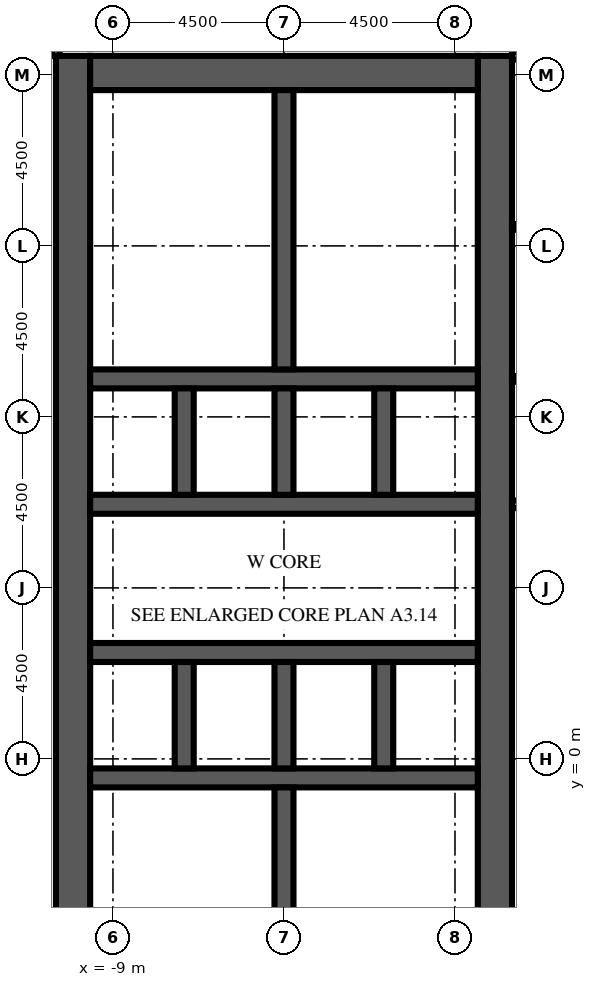
"""IFC4 building model, lengths in metres.
Left out: names, types, materials, properties, quantities, classifications, styles, units other than length and angle.
Written with IfcOpenShell. Run it as: python <this file> out.ifc"""

import sys

from ifc_helpers import new_model, si_unit, direction, frame, frame_2d, origin, place, context, subcontext, project, spatial, rectangle, extrude, element, fill, save


model = new_model("IFC4")
c1 = context("Model", 3, precision=1e-05, world=origin(), true_north=direction((0.0, 1.0)))
c2 = subcontext(c1, "Body", "Model", "MODEL_VIEW")
j1 = project(units=[si_unit("LENGTHUNIT", "METRE"), si_unit("PLANEANGLEUNIT", "RADIAN")], contexts=[c1])
p1 = place(None, origin())
s1 = spatial("IfcSite", under=j1, at=p1, CompositionType="ELEMENT")
p2 = place(p1, origin())
s2 = spatial("IfcBuilding", under=s1, at=p2, CompositionType="ELEMENT")
p3 = place(p2, frame((0.0, 0.0, 82.0)))
s3 = spatial("IfcBuildingStorey", under=s2, at=p3, CompositionType="ELEMENT", Elevation=82.0)
p4 = place(p3, frame((-10.05, -9.0, 0.0), z_axis=(0.0, 0.0, 1.0), x_axis=(0.0, 1.0, 0.0)))
e1 = element("IfcWall", 1, at=p4, inside=s3, PredefinedType="SHEAR", context=c2, shape_type="SweptSolid", body=[
    extrude(rectangle(XDim=27.5, YDim=0.9, at=frame_2d((13.75, 0.0))), origin(), (0.0, 0.0, 1.0), 4.1),
])
p5 = place(p4, frame((12.55, 0.0, 0.0)))
e2 = element("IfcOpeningElement", 2, at=p5, cuts=e1, PredefinedType="OPENING", context=c2, shape_type="SweptSolid", body=[
    extrude(rectangle(XDim=2.4, YDim=2.4, at=frame_2d((1.2, 1.2))), frame((0.0, 0.46, 0.0), z_axis=(0.0, -1.0, 0.0), x_axis=(1.0, 0.0, 0.0)), (0.0, 0.0, 1.0), 0.92),
])
p6 = place(p4, frame((6.825, 0.0, 0.0)))
e3 = element("IfcOpeningElement", 3, at=p6, cuts=e1, PredefinedType="OPENING", context=c2, shape_type="SweptSolid", body=[
    extrude(rectangle(XDim=1.2, YDim=2.1, at=frame_2d((0.6, 1.05))), frame((0.0, 0.46, 0.0), z_axis=(0.0, -1.0, 0.0), x_axis=(1.0, 0.0, 0.0)), (0.0, 0.0, 1.0), 0.92),
])
p7 = place(p4, frame((19.475, 0.0, 0.0)))
e4 = element("IfcOpeningElement", 4, at=p7, cuts=e1, PredefinedType="OPENING", context=c2, shape_type="SweptSolid", body=[
    extrude(rectangle(XDim=1.2, YDim=2.1, at=frame_2d((0.6, 1.05))), frame((0.0, 0.46, 0.0), z_axis=(0.0, -1.0, 0.0), x_axis=(1.0, 0.0, 0.0)), (0.0, 0.0, 1.0), 0.92),
])
p8 = place(p3, frame((1.05, -9.0, 0.0), z_axis=(0.0, 0.0, 1.0), x_axis=(0.0, 1.0, 0.0)))
e5 = element("IfcWall", 5, at=p8, inside=s3, PredefinedType="SHEAR", context=c2, shape_type="SweptSolid", body=[
    extrude(rectangle(XDim=27.5, YDim=0.9, at=frame_2d((13.75, 0.0))), origin(), (0.0, 0.0, 1.0), 4.1),
])
p9 = place(p8, frame((12.55, 0.0, 0.0)))
e6 = element("IfcOpeningElement", 6, at=p9, cuts=e5, PredefinedType="OPENING", context=c2, shape_type="SweptSolid", body=[
    extrude(rectangle(XDim=2.4, YDim=2.4, at=frame_2d((1.2, 1.2))), frame((0.0, 0.46, 0.0), z_axis=(0.0, -1.0, 0.0), x_axis=(1.0, 0.0, 0.0)), (0.0, 0.0, 1.0), 0.92),
])
p10 = place(p8, frame((5.445, 0.0, 0.0)))
e7 = element("IfcOpeningElement", 7, at=p10, cuts=e5, PredefinedType="OPENING", context=c2, shape_type="SweptSolid", body=[
    extrude(rectangle(XDim=1.2, YDim=2.1, at=frame_2d((0.6, 1.05))), frame((0.0, 0.46, 0.0), z_axis=(0.0, -1.0, 0.0), x_axis=(1.0, 0.0, 0.0)), (0.0, 0.0, 1.0), 0.92),
])
p11 = place(p8, frame((19.485, 0.0, 0.0)))
e8 = element("IfcOpeningElement", 8, at=p11, cuts=e5, PredefinedType="OPENING", context=c2, shape_type="SweptSolid", body=[
    extrude(rectangle(XDim=1.0, YDim=2.1, at=frame_2d((0.5, 1.05))), frame((0.0, 0.46, 0.0), z_axis=(0.0, -1.0, 0.0), x_axis=(1.0, 0.0, 0.0)), (0.0, 0.0, 1.0), 0.92),
])
p12 = place(p8, frame((21.139, 0.0, 0.0)))
e9 = element("IfcOpeningElement", 9, at=p12, cuts=e5, PredefinedType="OPENING", context=c2, shape_type="SweptSolid", body=[
    extrude(rectangle(XDim=1.0, YDim=2.1, at=frame_2d((0.5, 1.05))), frame((0.0, 0.46, 0.0), z_axis=(0.0, -1.0, 0.0), x_axis=(1.0, 0.0, 0.0)), (0.0, 0.0, 1.0), 0.92),
])
p13 = place(p8, frame((23.16, 0.0, 0.0)))
e10 = element("IfcOpeningElement", 10, at=p13, cuts=e5, PredefinedType="OPENING", context=c2, shape_type="SweptSolid", body=[
    extrude(rectangle(XDim=1.0, YDim=2.1, at=frame_2d((0.5, 1.05))), frame((0.0, 0.46, 0.0), z_axis=(0.0, -1.0, 0.0), x_axis=(1.0, 0.0, 0.0)), (0.0, 0.0, 1.0), 0.92),
])
p14 = place(p8, frame((25.181, 0.0, 0.0)))
e11 = element("IfcOpeningElement", 11, at=p14, cuts=e5, PredefinedType="OPENING", context=c2, shape_type="SweptSolid", body=[
    extrude(rectangle(XDim=1.0, YDim=2.1, at=frame_2d((0.5, 1.05))), frame((0.0, 0.46, 0.0), z_axis=(0.0, -1.0, 0.0), x_axis=(1.0, 0.0, 0.0)), (0.0, 0.0, 1.0), 0.92),
])
p15 = place(p3, frame((-9.6, 18.05, 0.0), z_axis=(0.0, 0.0, 1.0), x_axis=(1.0, 0.0, 0.0)))
e12 = element("IfcWall", 12, at=p15, inside=s3, PredefinedType="SHEAR", context=c2, shape_type="SweptSolid", body=[
    extrude(rectangle(XDim=10.2, YDim=0.9, at=frame_2d((5.1, 0.0))), origin(), (0.0, 0.0, 1.0), 4.1),
])
p16 = place(p3, frame((-9.6, -0.5, 0.0), z_axis=(0.0, 0.0, 1.0), x_axis=(1.0, 0.0, 0.0)))
e13 = element("IfcWall", 13, at=p16, inside=s3, PredefinedType="SHEAR", context=c2, shape_type="SweptSolid", body=[
    extrude(rectangle(XDim=10.2, YDim=0.5, at=frame_2d((5.1, 0.0))), origin(), (0.0, 0.0, 1.0), 4.1),
])
p17 = place(p3, frame((-9.6, 2.8, 0.0), z_axis=(0.0, 0.0, 1.0), x_axis=(1.0, 0.0, 0.0)))
e14 = element("IfcWall", 14, at=p17, inside=s3, PredefinedType="SHEAR", context=c2, shape_type="SweptSolid", body=[
    extrude(rectangle(XDim=10.2, YDim=0.5, at=frame_2d((5.1, 0.0))), origin(), (0.0, 0.0, 1.0), 4.1),
])
p18 = place(p17, frame((0.562, 0.0, 0.0)))
e15 = element("IfcOpeningElement", 15, at=p18, cuts=e14, PredefinedType="OPENING", context=c2, shape_type="SweptSolid", body=[
    extrude(rectangle(XDim=1.1, YDim=2.1, at=frame_2d((0.55, 1.05))), frame((0.0, 0.26, 0.0), z_axis=(0.0, -1.0, 0.0), x_axis=(1.0, 0.0, 0.0)), (0.0, 0.0, 1.0), 0.52),
])
p19 = place(p17, frame((3.238, 0.0, 0.0)))
e16 = element("IfcOpeningElement", 16, at=p19, cuts=e14, PredefinedType="OPENING", context=c2, shape_type="SweptSolid", body=[
    extrude(rectangle(XDim=1.1, YDim=2.1, at=frame_2d((0.55, 1.05))), frame((0.0, 0.26, 0.0), z_axis=(0.0, -1.0, 0.0), x_axis=(1.0, 0.0, 0.0)), (0.0, 0.0, 1.0), 0.52),
])
p20 = place(p17, frame((8.538, 0.0, 0.0)))
e17 = element("IfcOpeningElement", 17, at=p20, cuts=e14, PredefinedType="OPENING", context=c2, shape_type="SweptSolid", body=[
    extrude(rectangle(XDim=1.1, YDim=2.1, at=frame_2d((0.55, 1.05))), frame((0.0, 0.26, 0.0), z_axis=(0.0, -1.0, 0.0), x_axis=(1.0, 0.0, 0.0)), (0.0, 0.0, 1.0), 0.52),
])
p21 = place(p3, frame((-9.6, 6.7, 0.0), z_axis=(0.0, 0.0, 1.0), x_axis=(1.0, 0.0, 0.0)))
e18 = element("IfcWall", 18, at=p21, inside=s3, PredefinedType="SHEAR", context=c2, shape_type="SweptSolid", body=[
    extrude(rectangle(XDim=10.2, YDim=0.5, at=frame_2d((5.1, 0.0))), origin(), (0.0, 0.0, 1.0), 4.1),
])
p22 = place(p21, frame((0.562, 0.0, 0.0)))
e19 = element("IfcOpeningElement", 19, at=p22, cuts=e18, PredefinedType="OPENING", context=c2, shape_type="SweptSolid", body=[
    extrude(rectangle(XDim=1.1, YDim=2.1, at=frame_2d((0.55, 1.05))), frame((0.0, 0.26, 0.0), z_axis=(0.0, -1.0, 0.0), x_axis=(1.0, 0.0, 0.0)), (0.0, 0.0, 1.0), 0.52),
])
p23 = place(p21, frame((3.288, 0.0, 0.0)))
e20 = element("IfcOpeningElement", 20, at=p23, cuts=e18, PredefinedType="OPENING", context=c2, shape_type="SweptSolid", body=[
    extrude(rectangle(XDim=1.0, YDim=2.1, at=frame_2d((0.5, 1.05))), frame((0.0, 0.26, 0.0), z_axis=(0.0, -1.0, 0.0), x_axis=(1.0, 0.0, 0.0)), (0.0, 0.0, 1.0), 0.52),
])
p24 = place(p21, frame((5.913, 0.0, 0.0)))
e21 = element("IfcOpeningElement", 21, at=p24, cuts=e18, PredefinedType="OPENING", context=c2, shape_type="SweptSolid", body=[
    extrude(rectangle(XDim=1.0, YDim=2.1, at=frame_2d((0.5, 1.05))), frame((0.0, 0.26, 0.0), z_axis=(0.0, -1.0, 0.0), x_axis=(1.0, 0.0, 0.0)), (0.0, 0.0, 1.0), 0.52),
])
p25 = place(p21, frame((8.587, 0.0, 0.0)))
e22 = element("IfcOpeningElement", 22, at=p25, cuts=e18, PredefinedType="OPENING", context=c2, shape_type="SweptSolid", body=[
    extrude(rectangle(XDim=1.0, YDim=2.1, at=frame_2d((0.5, 1.05))), frame((0.0, 0.26, 0.0), z_axis=(0.0, -1.0, 0.0), x_axis=(1.0, 0.0, 0.0)), (0.0, 0.0, 1.0), 0.52),
])
p26 = place(p3, frame((-9.6, 10.0, 0.0), z_axis=(0.0, 0.0, 1.0), x_axis=(1.0, 0.0, 0.0)))
e23 = element("IfcWall", 23, at=p26, inside=s3, PredefinedType="SHEAR", context=c2, shape_type="SweptSolid", body=[
    extrude(rectangle(XDim=10.2, YDim=0.5, at=frame_2d((5.1, 0.0))), origin(), (0.0, 0.0, 1.0), 4.1),
])
for number, where, z_axis, x_axis in (
    (24, (-7.125, -0.25, 0.0), (0.0, 0.0, 1.0), (0.0, 1.0, 0.0)),
    (25, (-7.125, 6.95, 0.0), (0.0, 0.0, 1.0), (0.0, 1.0, 0.0)),
    (26, (-4.5, -0.25, 0.0), (0.0, 0.0, 1.0), (0.0, 1.0, 0.0)),
    (27, (-4.5, 6.95, 0.0), (0.0, 0.0, 1.0), (0.0, 1.0, 0.0)),
    (28, (-1.875, -0.25, 0.0), (0.0, 0.0, 1.0), (0.0, 1.0, 0.0)),
    (29, (-1.875, 6.95, 0.0), (0.0, 0.0, 1.0), (0.0, 1.0, 0.0)),
):
    element("IfcWall", number, at=place(p3, frame(where, z_axis=z_axis, x_axis=x_axis)), inside=s3, PredefinedType="SHEAR", context=c2, shape_type="SweptSolid", body=[
        extrude(rectangle(XDim=2.8, YDim=0.5, at=frame_2d((1.4, 0.0))), origin(), (0.0, 0.0, 1.0), 4.1),
    ])
for number, where, z_axis, x_axis in (
    (30, (-4.5, -8.1, 0.0), (0.0, 0.0, 1.0), (0.0, 1.0, 0.0)),
    (31, (-4.5, 10.25, 0.0), (0.0, 0.0, 1.0), (0.0, 1.0, 0.0)),
):
    element("IfcWall", number, at=place(p3, frame(where, z_axis=z_axis, x_axis=x_axis)), inside=s3, PredefinedType="SHEAR", context=c2, shape_type="SweptSolid", body=[
        extrude(rectangle(XDim=7.35, YDim=0.5, at=frame_2d((3.675, 0.0))), origin(), (0.0, 0.0, 1.0), 4.1),
    ])
p27 = place(p3, frame((-0.9, -5.16, 0.0), z_axis=(0.0, 0.0, 1.0), x_axis=(0.0, 1.0, 0.0)))
e32 = element("IfcWall", 32, at=p27, inside=s3, PredefinedType="PARTITIONING", context=c2, shape_type="SweptSolid", body=[
    extrude(rectangle(XDim=2.205, YDim=0.1, at=frame_2d((1.103, 0.0))), origin(), (0.0, 0.0, 1.0), 3.65),
])
p28 = place(p27, frame((0.603, 0.0, 0.0)))
e33 = element("IfcOpeningElement", 33, at=p28, cuts=e32, PredefinedType="OPENING", context=c2, shape_type="SweptSolid", body=[
    extrude(rectangle(XDim=1.0, YDim=2.1, at=frame_2d((0.5, 1.05))), frame((0.0, 0.06, 0.0), z_axis=(0.0, -1.0, 0.0), x_axis=(1.0, 0.0, 0.0)), (0.0, 0.0, 1.0), 0.12),
])
p29 = place(p3, frame((-0.9, -2.955, 0.0), z_axis=(0.0, 0.0, 1.0), x_axis=(0.0, 1.0, 0.0)))
e34 = element("IfcWall", 34, at=p29, inside=s3, PredefinedType="PARTITIONING", context=c2, shape_type="SweptSolid", body=[
    extrude(rectangle(XDim=2.205, YDim=0.1, at=frame_2d((1.103, 0.0))), origin(), (0.0, 0.0, 1.0), 3.65),
])
p30 = place(p29, frame((0.603, 0.0, 0.0)))
e35 = element("IfcOpeningElement", 35, at=p30, cuts=e34, PredefinedType="OPENING", context=c2, shape_type="SweptSolid", body=[
    extrude(rectangle(XDim=1.0, YDim=2.1, at=frame_2d((0.5, 1.05))), frame((0.0, 0.06, 0.0), z_axis=(0.0, -1.0, 0.0), x_axis=(1.0, 0.0, 0.0)), (0.0, 0.0, 1.0), 0.12),
])
p31 = place(p3, frame((-4.25, -2.955, 0.0), z_axis=(0.0, 0.0, 1.0), x_axis=(1.0, 0.0, 0.0)))
e36 = element("IfcWall", 36, at=p31, inside=s3, PredefinedType="PARTITIONING", context=c2, shape_type="SweptSolid", body=[
    extrude(rectangle(XDim=3.35, YDim=0.1, at=frame_2d((1.675, 0.0))), origin(), (0.0, 0.0, 1.0), 3.65),
])
for number, where, z_axis, x_axis in (
    (37, (-4.25, 11.72, 0.0), (0.0, 0.0, 1.0), (1.0, 0.0, 0.0)),
    (38, (-4.25, 13.558, 0.0), (0.0, 0.0, 1.0), (1.0, 0.0, 0.0)),
    (39, (-4.25, 15.762, 0.0), (0.0, 0.0, 1.0), (1.0, 0.0, 0.0)),
):
    element("IfcWall", number, at=place(p3, frame(where, z_axis=z_axis, x_axis=x_axis)), inside=s3, PredefinedType="PARTITIONING", context=c2, shape_type="SweptSolid", body=[
        extrude(rectangle(XDim=4.85, YDim=0.1, at=frame_2d((2.425, 0.0))), origin(), (0.0, 0.0, 1.0), 3.65),
    ])
p32 = place(p3, frame((-10.5, 31.35, 0.0), z_axis=(0.0, 0.0, 1.0), x_axis=(0.0, -1.0, 0.0)))
e40 = element("IfcWall", 40, at=p32, inside=s3, PredefinedType="PARTITIONING", context=c2, shape_type="SweptSolid", body=[
    extrude(rectangle(XDim=12.85, YDim=0.2, at=frame_2d((6.425, 0.0))), origin(), (0.0, 0.0, 1.0), 3.65),
])
p33 = place(p32, frame((9.75, 0.0, 0.0)))
e41 = element("IfcOpeningElement", 41, at=p33, cuts=e40, PredefinedType="OPENING", context=c2, shape_type="SweptSolid", body=[
    extrude(rectangle(XDim=1.0, YDim=2.1, at=frame_2d((0.5, 1.05))), frame((0.0, 0.11, 0.0), z_axis=(0.0, -1.0, 0.0), x_axis=(1.0, 0.0, 0.0)), (0.0, 0.0, 1.0), 0.22),
])
p34 = place(p3, frame((1.5, 6.7, 0.0), z_axis=(0.0, 0.0, 1.0), x_axis=(1.0, 0.0, 0.0)))
e42 = element("IfcWall", 42, at=p34, inside=s3, PredefinedType="PARTITIONING", context=c2, shape_type="SweptSolid", body=[
    extrude(rectangle(XDim=4.5, YDim=0.2, at=frame_2d((2.25, 0.0))), origin(), (0.0, 0.0, 1.0), 3.65),
])
p35 = place(p34, frame((1.85, 0.0, 0.0)))
e43 = element("IfcOpeningElement", 43, at=p35, cuts=e42, PredefinedType="OPENING", context=c2, shape_type="SweptSolid", body=[
    extrude(rectangle(XDim=1.0, YDim=2.1, at=frame_2d((0.5, 1.05))), frame((0.0, 0.11, 0.0), z_axis=(0.0, -1.0, 0.0), x_axis=(1.0, 0.0, 0.0)), (0.0, 0.0, 1.0), 0.22),
])
p36 = place(p3, frame((1.5, 10.0, 0.0), z_axis=(0.0, 0.0, 1.0), x_axis=(1.0, 0.0, 0.0)))
e44 = element("IfcWall", 44, at=p36, inside=s3, PredefinedType="PARTITIONING", context=c2, shape_type="SweptSolid", body=[
    extrude(rectangle(XDim=4.5, YDim=0.15, at=frame_2d((2.25, 0.0))), origin(), (0.0, 0.0, 1.0), 3.65),
])
p37 = place(p36, frame((1.35, 0.0, 0.0)))
e45 = element("IfcOpeningElement", 45, at=p37, cuts=e44, PredefinedType="OPENING", context=c2, shape_type="SweptSolid", body=[
    extrude(rectangle(XDim=1.0, YDim=2.1, at=frame_2d((0.5, 1.05))), frame((0.0, 0.085, 0.0), z_axis=(0.0, -1.0, 0.0), x_axis=(1.0, 0.0, 0.0)), (0.0, 0.0, 1.0), 0.17),
])
p38 = place(p3, frame((1.5, 14.0, 0.0), z_axis=(0.0, 0.0, 1.0), x_axis=(1.0, 0.0, 0.0)))
e46 = element("IfcWall", 46, at=p38, inside=s3, PredefinedType="PARTITIONING", context=c2, shape_type="SweptSolid", body=[
    extrude(rectangle(XDim=4.5, YDim=0.15, at=frame_2d((2.25, 0.0))), origin(), (0.0, 0.0, 1.0), 3.65),
])
p39 = place(p38, frame((1.85, 0.0, 0.0)))
e47 = element("IfcOpeningElement", 47, at=p39, cuts=e46, PredefinedType="OPENING", context=c2, shape_type="SweptSolid", body=[
    extrude(rectangle(XDim=1.0, YDim=2.1, at=frame_2d((0.5, 1.05))), frame((0.0, 0.085, 0.0), z_axis=(0.0, -1.0, 0.0), x_axis=(1.0, 0.0, 0.0)), (0.0, 0.0, 1.0), 0.17),
])
p40 = place(p3, frame((1.5, 18.5, 0.0), z_axis=(0.0, 0.0, 1.0), x_axis=(1.0, 0.0, 0.0)))
e48 = element("IfcWall", 48, at=p40, inside=s3, PredefinedType="PARTITIONING", context=c2, shape_type="SweptSolid", body=[
    extrude(rectangle(XDim=4.5, YDim=0.2, at=frame_2d((2.25, 0.0))), origin(), (0.0, 0.0, 1.0), 3.65),
])
p41 = place(p18, origin())
e49 = element("IfcDoor", 49, at=p41, inside=s3, OperationType="DOUBLE_DOOR_SLIDING", PredefinedType="DOOR", context=c2, shape_type="SweptSolid", body=[
    extrude(rectangle(XDim=1.1, YDim=2.1, at=frame_2d((0.55, 1.05))), frame((0.0, 0.025, 0.0), z_axis=(0.0, -1.0, 0.0), x_axis=(1.0, 0.0, 0.0)), (0.0, 0.0, 1.0), 0.05),
])
fill(e15, e49)
p42 = place(p19, origin())
e50 = element("IfcDoor", 50, at=p42, inside=s3, OperationType="DOUBLE_DOOR_SLIDING", PredefinedType="DOOR", context=c2, shape_type="SweptSolid", body=[
    extrude(rectangle(XDim=1.1, YDim=2.1, at=frame_2d((0.55, 1.05))), frame((0.0, 0.025, 0.0), z_axis=(0.0, -1.0, 0.0), x_axis=(1.0, 0.0, 0.0)), (0.0, 0.0, 1.0), 0.05),
])
fill(e16, e50)
p43 = place(p20, origin())
e51 = element("IfcDoor", 51, at=p43, inside=s3, OperationType="DOUBLE_DOOR_SLIDING", PredefinedType="DOOR", context=c2, shape_type="SweptSolid", body=[
    extrude(rectangle(XDim=1.1, YDim=2.1, at=frame_2d((0.55, 1.05))), frame((0.0, 0.025, 0.0), z_axis=(0.0, -1.0, 0.0), x_axis=(1.0, 0.0, 0.0)), (0.0, 0.0, 1.0), 0.05),
])
fill(e17, e51)
p44 = place(p22, origin())
e52 = element("IfcDoor", 52, at=p44, inside=s3, OperationType="DOUBLE_DOOR_SLIDING", PredefinedType="DOOR", context=c2, shape_type="SweptSolid", body=[
    extrude(rectangle(XDim=1.1, YDim=2.1, at=frame_2d((0.55, 1.05))), frame((0.0, 0.025, 0.0), z_axis=(0.0, -1.0, 0.0), x_axis=(1.0, 0.0, 0.0)), (0.0, 0.0, 1.0), 0.05),
])
fill(e19, e52)
p45 = place(p5, origin())
e53 = element("IfcDoor", 53, at=p45, inside=s3, OperationType="DOUBLE_DOOR_DOUBLE_SWING", PredefinedType="DOOR", context=c2, shape_type="SweptSolid", body=[
    extrude(rectangle(XDim=2.4, YDim=2.4, at=frame_2d((1.2, 1.2))), frame((0.0, 0.025, 0.0), z_axis=(0.0, -1.0, 0.0), x_axis=(1.0, 0.0, 0.0)), (0.0, 0.0, 1.0), 0.05),
])
fill(e2, e53)
p46 = place(p9, origin())
e54 = element("IfcDoor", 54, at=p46, inside=s3, OperationType="DOUBLE_DOOR_DOUBLE_SWING", PredefinedType="DOOR", context=c2, shape_type="SweptSolid", body=[
    extrude(rectangle(XDim=2.4, YDim=2.4, at=frame_2d((1.2, 1.2))), frame((0.0, 0.025, 0.0), z_axis=(0.0, -1.0, 0.0), x_axis=(1.0, 0.0, 0.0)), (0.0, 0.0, 1.0), 0.05),
])
fill(e6, e54)
p47 = place(p6, origin())
e55 = element("IfcDoor", 55, at=p47, inside=s3, OperationType="SINGLE_SWING_LEFT", PredefinedType="DOOR", context=c2, shape_type="SweptSolid", body=[
    extrude(rectangle(XDim=1.2, YDim=2.1, at=frame_2d((0.6, 1.05))), frame((0.0, 0.025, 0.0), z_axis=(0.0, -1.0, 0.0), x_axis=(1.0, 0.0, 0.0)), (0.0, 0.0, 1.0), 0.05),
])
fill(e3, e55)
p48 = place(p7, origin())
e56 = element("IfcDoor", 56, at=p48, inside=s3, OperationType="SINGLE_SWING_LEFT", PredefinedType="DOOR", context=c2, shape_type="SweptSolid", body=[
    extrude(rectangle(XDim=1.2, YDim=2.1, at=frame_2d((0.6, 1.05))), frame((0.0, 0.025, 0.0), z_axis=(0.0, -1.0, 0.0), x_axis=(1.0, 0.0, 0.0)), (0.0, 0.0, 1.0), 0.05),
])
fill(e4, e56)
p49 = place(p23, origin())
e57 = element("IfcDoor", 57, at=p49, inside=s3, OperationType="SINGLE_SWING_RIGHT", PredefinedType="DOOR", context=c2, shape_type="SweptSolid", body=[
    extrude(rectangle(XDim=1.0, YDim=2.1, at=frame_2d((0.5, 1.05))), frame((0.0, 0.025, 0.0), z_axis=(0.0, -1.0, 0.0), x_axis=(1.0, 0.0, 0.0)), (0.0, 0.0, 1.0), 0.05),
])
fill(e20, e57)
p50 = place(p24, origin())
e58 = element("IfcDoor", 58, at=p50, inside=s3, OperationType="SINGLE_SWING_LEFT", PredefinedType="DOOR", context=c2, shape_type="SweptSolid", body=[
    extrude(rectangle(XDim=1.0, YDim=2.1, at=frame_2d((0.5, 1.05))), frame((0.0, 0.025, 0.0), z_axis=(0.0, -1.0, 0.0), x_axis=(1.0, 0.0, 0.0)), (0.0, 0.0, 1.0), 0.05),
])
fill(e21, e58)
p51 = place(p25, origin())
e59 = element("IfcDoor", 59, at=p51, inside=s3, OperationType="SINGLE_SWING_RIGHT", PredefinedType="DOOR", context=c2, shape_type="SweptSolid", body=[
    extrude(rectangle(XDim=1.0, YDim=2.1, at=frame_2d((0.5, 1.05))), frame((0.0, 0.025, 0.0), z_axis=(0.0, -1.0, 0.0), x_axis=(1.0, 0.0, 0.0)), (0.0, 0.0, 1.0), 0.05),
])
fill(e22, e59)
p52 = place(p10, origin())
e60 = element("IfcDoor", 60, at=p52, inside=s3, OperationType="SINGLE_SWING_LEFT", PredefinedType="DOOR", context=c2, shape_type="SweptSolid", body=[
    extrude(rectangle(XDim=1.2, YDim=2.1, at=frame_2d((0.6, 1.05))), frame((0.0, 0.425, 0.0), z_axis=(0.0, -1.0, 0.0), x_axis=(1.0, 0.0, 0.0)), (0.0, 0.0, 1.0), 0.05),
])
fill(e7, e60)
p53 = place(p28, origin())
e61 = element("IfcDoor", 61, at=p53, inside=s3, OperationType="SINGLE_SWING_LEFT", PredefinedType="DOOR", context=c2, shape_type="SweptSolid", body=[
    extrude(rectangle(XDim=1.0, YDim=2.1, at=frame_2d((0.5, 1.05))), frame((0.0, 0.025, 0.0), z_axis=(0.0, -1.0, 0.0), x_axis=(1.0, 0.0, 0.0)), (0.0, 0.0, 1.0), 0.05),
])
fill(e33, e61)
p54 = place(p30, origin())
e62 = element("IfcDoor", 62, at=p54, inside=s3, OperationType="SINGLE_SWING_RIGHT", PredefinedType="DOOR", context=c2, shape_type="SweptSolid", body=[
    extrude(rectangle(XDim=1.0, YDim=2.1, at=frame_2d((0.5, 1.05))), frame((0.0, 0.025, 0.0), z_axis=(0.0, -1.0, 0.0), x_axis=(1.0, 0.0, 0.0)), (0.0, 0.0, 1.0), 0.05),
])
fill(e35, e62)
p55 = place(p11, origin())
e63 = element("IfcDoor", 63, at=p55, inside=s3, OperationType="SINGLE_SWING_LEFT", PredefinedType="DOOR", context=c2, shape_type="SweptSolid", body=[
    extrude(rectangle(XDim=1.0, YDim=2.1, at=frame_2d((0.5, 1.05))), frame((0.0, 0.425, 0.0), z_axis=(0.0, -1.0, 0.0), x_axis=(1.0, 0.0, 0.0)), (0.0, 0.0, 1.0), 0.05),
])
fill(e8, e63)
p56 = place(p12, origin())
e64 = element("IfcDoor", 64, at=p56, inside=s3, OperationType="SINGLE_SWING_RIGHT", PredefinedType="DOOR", context=c2, shape_type="SweptSolid", body=[
    extrude(rectangle(XDim=1.0, YDim=2.1, at=frame_2d((0.5, 1.05))), frame((0.0, 0.425, 0.0), z_axis=(0.0, -1.0, 0.0), x_axis=(1.0, 0.0, 0.0)), (0.0, 0.0, 1.0), 0.05),
])
fill(e9, e64)
p57 = place(p13, origin())
e65 = element("IfcDoor", 65, at=p57, inside=s3, OperationType="SINGLE_SWING_LEFT", PredefinedType="DOOR", context=c2, shape_type="SweptSolid", body=[
    extrude(rectangle(XDim=1.0, YDim=2.1, at=frame_2d((0.5, 1.05))), frame((0.0, 0.425, 0.0), z_axis=(0.0, -1.0, 0.0), x_axis=(1.0, 0.0, 0.0)), (0.0, 0.0, 1.0), 0.05),
])
fill(e10, e65)
p58 = place(p14, origin())
e66 = element("IfcDoor", 66, at=p58, inside=s3, OperationType="SINGLE_SWING_RIGHT", PredefinedType="DOOR", context=c2, shape_type="SweptSolid", body=[
    extrude(rectangle(XDim=1.0, YDim=2.1, at=frame_2d((0.5, 1.05))), frame((0.0, 0.425, 0.0), z_axis=(0.0, -1.0, 0.0), x_axis=(1.0, 0.0, 0.0)), (0.0, 0.0, 1.0), 0.05),
])
fill(e11, e66)
save(model, sys.argv[1])
